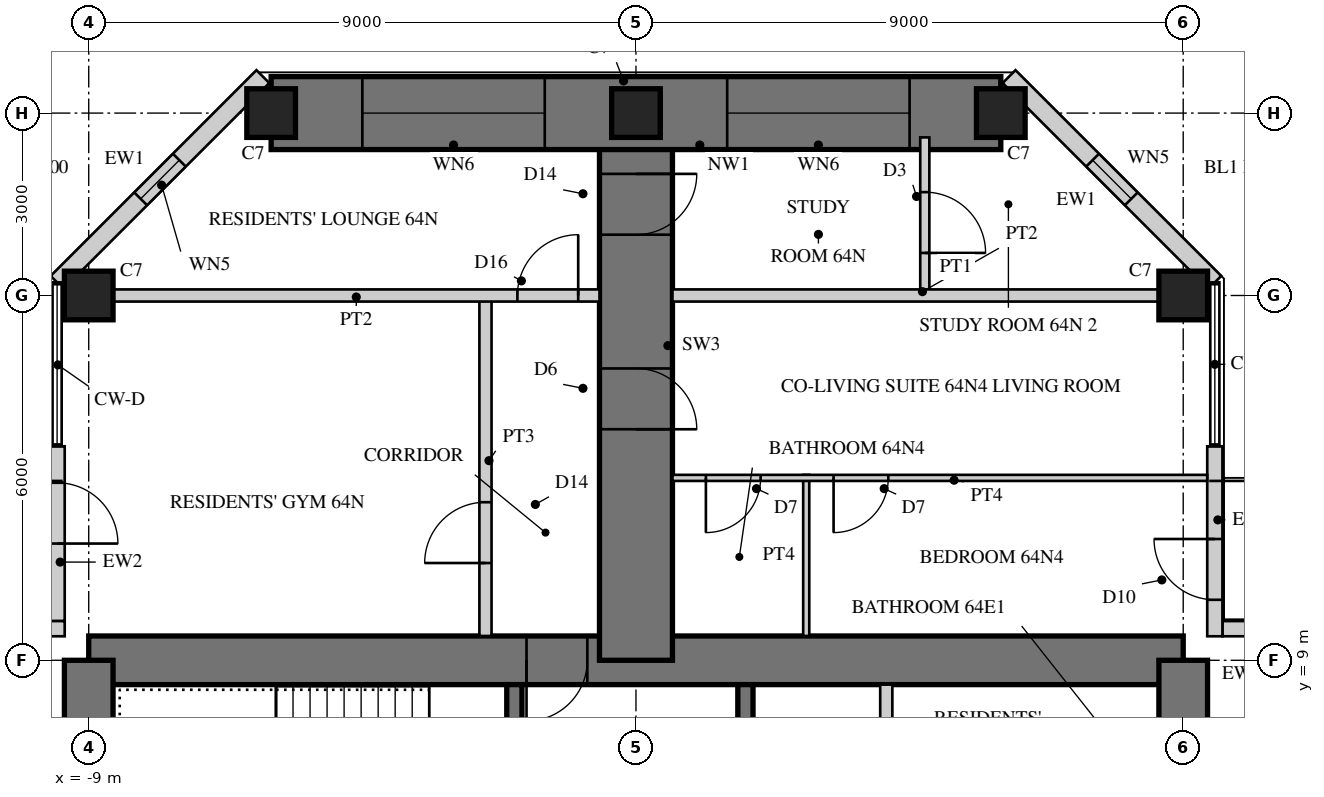
"""IFC4 building model, lengths in metres.
Left out: names, types, materials, properties, quantities, classifications, styles, units other than length and angle.
Written with IfcOpenShell. Run it as: python <this file> out.ifc"""

import sys

from ifc_helpers import new_model, si_unit, direction, frame, frame_2d, origin, origin_2d, place, context, subcontext, project, spatial, rectangle, hollow_rectangle, extrude, element, fill, save


model = new_model("IFC4")
c1 = context("Model", 3, precision=1e-05, world=origin(), true_north=direction((0.0, 1.0)))
c2 = subcontext(c1, "Body", "Model", "MODEL_VIEW")
j1 = project(units=[si_unit("LENGTHUNIT", "METRE"), si_unit("PLANEANGLEUNIT", "RADIAN")], contexts=[c1])
p1 = place(None, origin())
s1 = spatial("IfcSite", under=j1, at=p1, CompositionType="ELEMENT")
p2 = place(p1, origin())
s2 = spatial("IfcBuilding", under=s1, at=p2, CompositionType="ELEMENT")
p3 = place(p2, frame((0.0, 0.0, 249.3)))
s3 = spatial("IfcBuildingStorey", under=s2, at=p3, CompositionType="ELEMENT", Elevation=249.3)
p4 = place(p3, frame((9.0, 9.0, 0.0), z_axis=(0.0, 0.0, 1.0), x_axis=(-1.0, 0.0, 0.0)))
e1 = element("IfcWall", 1, at=p4, inside=s3, PredefinedType="SHEAR", context=c2, shape_type="SweptSolid", body=[
    extrude(rectangle(XDim=18.0, YDim=0.8, at=frame_2d((9.0, 0.0))), origin(), (0.0, 0.0, 1.0), 3.4),
])
p5 = place(p4, frame((9.8, 0.0, 0.0)))
e2 = element("IfcOpeningElement", 2, at=p5, cuts=e1, PredefinedType="OPENING", context=c2, shape_type="SweptSolid", body=[
    extrude(rectangle(XDim=1.0, YDim=2.4, at=frame_2d((0.5, 1.2))), frame((0.0, 0.41, 0.0), z_axis=(0.0, -1.0, 0.0), x_axis=(1.0, 0.0, 0.0)), (0.0, 0.0, 1.0), 0.82),
])
p6 = place(p3, frame((9.0, -9.0, 0.0), z_axis=(0.0, 0.0, 1.0), x_axis=(0.0, 1.0, 0.0)))
e3 = element("IfcWall", 3, at=p6, inside=s3, PredefinedType="SHEAR", context=c2, shape_type="SweptSolid", body=[
    extrude(rectangle(XDim=18.0, YDim=0.8, at=frame_2d((9.0, 0.0))), origin(), (0.0, 0.0, 1.0), 3.4),
])
p7 = place(p6, frame((9.8, 0.0, 0.0)))
e4 = element("IfcOpeningElement", 4, at=p7, cuts=e3, PredefinedType="OPENING", context=c2, shape_type="SweptSolid", body=[
    extrude(rectangle(XDim=1.0, YDim=2.4, at=frame_2d((0.5, 1.2))), frame((0.0, 0.41, 0.0), z_axis=(0.0, -1.0, 0.0), x_axis=(1.0, 0.0, 0.0)), (0.0, 0.0, 1.0), 0.82),
])
p8 = place(p3, frame((-9.0, 9.0, 0.0), z_axis=(0.0, 0.0, 1.0), x_axis=(0.0, -1.0, 0.0)))
e5 = element("IfcWall", 5, at=p8, inside=s3, PredefinedType="SHEAR", context=c2, shape_type="SweptSolid", body=[
    extrude(rectangle(XDim=18.0, YDim=0.8, at=frame_2d((9.0, 0.0))), origin(), (0.0, 0.0, 1.0), 3.4),
])
p9 = place(p8, frame((9.8, 0.0, 0.0)))
e6 = element("IfcOpeningElement", 6, at=p9, cuts=e5, PredefinedType="OPENING", context=c2, shape_type="SweptSolid", body=[
    extrude(rectangle(XDim=1.0, YDim=2.4, at=frame_2d((0.5, 1.2))), frame((0.0, 0.41, 0.0), z_axis=(0.0, -1.0, 0.0), x_axis=(1.0, 0.0, 0.0)), (0.0, 0.0, 1.0), 0.82),
])
p10 = place(p3, frame((1.8, 1.875, 0.0), z_axis=(0.0, 0.0, 1.0), x_axis=(0.0, 1.0, 0.0)))
e7 = element("IfcWall", 7, at=p10, inside=s3, PredefinedType="SHEAR", context=c2, shape_type="SweptSolid", body=[
    extrude(rectangle(XDim=6.725, YDim=0.25, at=frame_2d((3.363, 0.0))), origin(), (0.0, 0.0, 1.0), 3.4),
])
p11 = place(p10, frame((1.875, 0.0, 0.0)))
e8 = element("IfcOpeningElement", 8, at=p11, cuts=e7, PredefinedType="OPENING", context=c2, shape_type="SweptSolid", body=[
    extrude(rectangle(XDim=1.6, YDim=2.4, at=frame_2d((0.8, 1.2))), frame((0.0, 0.135, 0.0), z_axis=(0.0, -1.0, 0.0), x_axis=(1.0, 0.0, 0.0)), (0.0, 0.0, 1.0), 0.27),
])
p12 = place(p3, frame((4.117, 5.975, 0.0), z_axis=(0.0, 0.0, 1.0), x_axis=(0.0, 1.0, 0.0)))
e9 = element("IfcWall", 9, at=p12, inside=s3, PredefinedType="PARTITIONING", context=c2, shape_type="SweptSolid", body=[
    extrude(rectangle(XDim=2.625, YDim=0.2, at=frame_2d((1.312, 0.0))), origin(), (0.0, 0.0, 1.0), 3.4),
])
p13 = place(p3, frame((-2.0, 1.675, 0.0), z_axis=(0.0, 0.0, 1.0), x_axis=(0.0, 1.0, 0.0)))
e10 = element("IfcWall", 10, at=p13, inside=s3, PredefinedType="SHEAR", context=c2, shape_type="SweptSolid", body=[
    extrude(rectangle(XDim=6.925, YDim=0.25, at=frame_2d((3.462, 0.0))), origin(), (0.0, 0.0, 1.0), 3.4),
])
p14 = place(p13, frame((0.725, 0.0, 0.0)))
e11 = element("IfcOpeningElement", 11, at=p14, cuts=e10, PredefinedType="OPENING", context=c2, shape_type="SweptSolid", body=[
    extrude(rectangle(XDim=1.0, YDim=2.1, at=frame_2d((0.5, 1.05))), frame((0.0, 0.135, 0.0), z_axis=(0.0, -1.0, 0.0), x_axis=(1.0, 0.0, 0.0)), (0.0, 0.0, 1.0), 0.27),
])
p15 = place(p3, frame((0.0, 9.0, 0.0), z_axis=(0.0, 0.0, 1.0), x_axis=(0.0, 1.0, 0.0)))
e12 = element("IfcWall", 12, at=p15, inside=s3, PredefinedType="SHEAR", context=c2, shape_type="SweptSolid", body=[
    extrude(rectangle(XDim=9.0, YDim=1.2, at=frame_2d((4.5, 0.0))), origin(), (0.0, 0.0, 1.0), 3.4),
])
p16 = place(p15, frame((3.8, 0.0, 0.0)))
e13 = element("IfcOpeningElement", 13, at=p16, cuts=e12, PredefinedType="OPENING", context=c2, shape_type="SweptSolid", body=[
    extrude(rectangle(XDim=1.0, YDim=2.15, at=frame_2d((0.5, 1.075))), frame((0.0, 0.61, 0.0), z_axis=(0.0, -1.0, 0.0), x_axis=(1.0, 0.0, 0.0)), (0.0, 0.0, 1.0), 1.22),
])
p17 = place(p15, frame((7.0, 0.0, 0.0)))
e14 = element("IfcOpeningElement", 14, at=p17, cuts=e12, PredefinedType="OPENING", context=c2, shape_type="SweptSolid", body=[
    extrude(rectangle(XDim=1.0, YDim=2.2, at=frame_2d((0.5, 1.1))), frame((0.0, 0.61, 0.0), z_axis=(0.0, -1.0, 0.0), x_axis=(1.0, 0.0, 0.0)), (0.0, 0.0, 1.0), 1.22),
])
p18 = place(p3, frame((6.0, 18.0, 0.0), z_axis=(0.0, 0.0, 1.0), x_axis=(-1.0, 0.0, 0.0)))
e15 = element("IfcWall", 15, at=p18, inside=s3, PredefinedType="SHEAR", context=c2, shape_type="SweptSolid", body=[
    extrude(rectangle(XDim=12.0, YDim=1.2, at=frame_2d((6.0, 0.0))), origin(), (0.0, 0.0, 1.0), 3.4),
])
p19 = place(p18, frame((1.5, 0.0, 0.6)))
e16 = element("IfcOpeningElement", 16, at=p19, cuts=e15, PredefinedType="OPENING", context=c2, shape_type="SweptSolid", body=[
    extrude(rectangle(XDim=3.0, YDim=2.4, at=frame_2d((1.5, 1.2))), frame((0.0, 0.61, 0.0), z_axis=(0.0, -1.0, 0.0), x_axis=(1.0, 0.0, 0.0)), (0.0, 0.0, 1.0), 1.22),
])
p20 = place(p18, frame((7.5, 0.0, 0.6)))
e17 = element("IfcOpeningElement", 17, at=p20, cuts=e15, PredefinedType="OPENING", context=c2, shape_type="SweptSolid", body=[
    extrude(rectangle(XDim=3.0, YDim=2.4, at=frame_2d((1.5, 1.2))), frame((0.0, 0.61, 0.0), z_axis=(0.0, -1.0, 0.0), x_axis=(1.0, 0.0, 0.0)), (0.0, 0.0, 1.0), 1.22),
])
for number, where, z_axis, x_axis in (
    (18, (9.0, 15.0, 0.0), (0.0, 0.0, 1.0), (1.0, 0.0, 0.0)),
    (19, (-9.0, 15.0, 0.0), (0.0, 0.0, 1.0), (1.0, 0.0, 0.0)),
    (20, (6.0, 18.0, 0.0), (0.0, 0.0, 1.0), (1.0, 0.0, 0.0)),
    (21, (0.0, 18.0, 0.0), (0.0, 0.0, 1.0), (1.0, 0.0, 0.0)),
    (22, (-6.0, 18.0, 0.0), (0.0, 0.0, 1.0), (1.0, 0.0, 0.0)),
):
    element("IfcColumn", number, at=place(p3, frame(where, z_axis=z_axis, x_axis=x_axis)), inside=s3, PredefinedType="COLUMN", context=c2, shape_type="SweptSolid", body=[
        extrude(rectangle(XDim=0.8, YDim=0.8, at=origin_2d()), origin(), (0.0, 0.0, 1.0), 3.4),
    ])
p21 = place(p3, frame((12.52, 9.52, 0.0), z_axis=(0.0, 0.0, 1.0), x_axis=(-1.0, 0.0, 0.0)))
e23 = element("IfcWall", 23, at=p21, inside=s3, PredefinedType="SOLIDWALL", context=c2, shape_type="SweptSolid", body=[
    extrude(rectangle(XDim=2.875, YDim=0.25, at=frame_2d((1.438, 0.0))), origin(), (0.0, 0.0, 1.0), 3.15),
])
p22 = place(p21, frame((0.6, 0.0, 0.0)))
e24 = element("IfcOpeningElement", 24, at=p22, cuts=e23, PredefinedType="OPENING", context=c2, shape_type="SweptSolid", body=[
    extrude(rectangle(XDim=1.0, YDim=2.2, at=frame_2d((0.5, 1.1))), frame((0.0, 0.135, 0.0), z_axis=(0.0, -1.0, 0.0), x_axis=(1.0, 0.0, 0.0)), (0.0, 0.0, 1.0), 0.27),
])
p23 = place(p3, frame((9.52, 9.395, 0.0), z_axis=(0.0, 0.0, 1.0), x_axis=(0.0, 1.0, 0.0)))
e25 = element("IfcWall", 25, at=p23, inside=s3, PredefinedType="SOLIDWALL", context=c2, shape_type="SweptSolid", body=[
    extrude(rectangle(XDim=3.125, YDim=0.25, at=frame_2d((1.562, 0.0))), origin(), (0.0, 0.0, 1.0), 3.15),
])
p24 = place(p23, frame((0.6, 0.0, 0.0)))
e26 = element("IfcOpeningElement", 26, at=p24, cuts=e25, PredefinedType="OPENING", context=c2, shape_type="SweptSolid", body=[
    extrude(rectangle(XDim=1.0, YDim=2.2, at=frame_2d((0.5, 1.1))), frame((0.0, 0.135, 0.0), z_axis=(0.0, -1.0, 0.0), x_axis=(1.0, 0.0, 0.0)), (0.0, 0.0, 1.0), 0.27),
])
p25 = place(p3, frame((9.52, 15.215, 0.0), z_axis=(0.0, 0.0, 1.0), x_axis=(-0.707081278264, 0.707132283189, 0.0)))
e27 = element("IfcWall", 27, at=p25, inside=s3, PredefinedType="SOLIDWALL", context=c2, shape_type="SweptSolid", body=[
    extrude(rectangle(XDim=4.787, YDim=0.3, at=frame_2d((2.393, 0.0))), origin(), (0.0, 0.0, 1.0), 3.15),
])
p26 = place(p25, frame((1.943, 0.0, 0.3)))
e28 = element("IfcOpeningElement", 28, at=p26, cuts=e27, PredefinedType="OPENING", context=c2, shape_type="SweptSolid", body=[
    extrude(rectangle(XDim=0.9, YDim=2.4, at=frame_2d((0.45, 1.2))), frame((0.0, 0.16, 0.0), z_axis=(0.0, -1.0, 0.0), x_axis=(1.0, 0.0, 0.0)), (0.0, 0.0, 1.0), 0.32),
])
p27 = place(p3, frame((-6.135, 18.6, 0.0), z_axis=(0.0, 0.0, 1.0), x_axis=(-0.707081278264, -0.707132283189, 0.0)))
e29 = element("IfcWall", 29, at=p27, inside=s3, PredefinedType="SOLIDWALL", context=c2, shape_type="SweptSolid", body=[
    extrude(rectangle(XDim=4.787, YDim=0.3, at=frame_2d((2.393, 0.0))), origin(), (0.0, 0.0, 1.0), 3.15),
])
p28 = place(p27, frame((1.943, 0.0, 0.3)))
e30 = element("IfcOpeningElement", 30, at=p28, cuts=e29, PredefinedType="OPENING", context=c2, shape_type="SweptSolid", body=[
    extrude(rectangle(XDim=0.9, YDim=2.4, at=frame_2d((0.45, 1.2))), frame((0.0, 0.16, 0.0), z_axis=(0.0, -1.0, 0.0), x_axis=(1.0, 0.0, 0.0)), (0.0, 0.0, 1.0), 0.32),
])
p29 = place(p3, frame((-9.52, 12.52, 0.0), z_axis=(0.0, 0.0, 1.0), x_axis=(0.0, -1.0, 0.0)))
e31 = element("IfcWall", 31, at=p29, inside=s3, PredefinedType="SOLIDWALL", context=c2, shape_type="SweptSolid", body=[
    extrude(rectangle(XDim=2.875, YDim=0.25, at=frame_2d((1.438, 0.0))), origin(), (0.0, 0.0, 1.0), 3.15),
])
p30 = place(p29, frame((0.6, 0.0, 0.0)))
e32 = element("IfcOpeningElement", 32, at=p30, cuts=e31, PredefinedType="OPENING", context=c2, shape_type="SweptSolid", body=[
    extrude(rectangle(XDim=1.0, YDim=2.2, at=frame_2d((0.5, 1.1))), frame((0.0, 0.135, 0.0), z_axis=(0.0, -1.0, 0.0), x_axis=(1.0, 0.0, 0.0)), (0.0, 0.0, 1.0), 0.27),
])
p31 = place(p3, frame((-9.395, 9.52, 0.0), z_axis=(0.0, 0.0, 1.0), x_axis=(-1.0, 0.0, 0.0)))
e33 = element("IfcWall", 33, at=p31, inside=s3, PredefinedType="SOLIDWALL", context=c2, shape_type="SweptSolid", body=[
    extrude(rectangle(XDim=3.125, YDim=0.25, at=frame_2d((1.562, 0.0))), origin(), (0.0, 0.0, 1.0), 3.15),
])
p32 = place(p31, frame((0.6, 0.0, 0.0)))
e34 = element("IfcOpeningElement", 34, at=p32, cuts=e33, PredefinedType="OPENING", context=c2, shape_type="SweptSolid", body=[
    extrude(rectangle(XDim=1.0, YDim=2.2, at=frame_2d((0.5, 1.1))), frame((0.0, 0.135, 0.0), z_axis=(0.0, -1.0, 0.0), x_axis=(1.0, 0.0, 0.0)), (0.0, 0.0, 1.0), 0.27),
])
p33 = place(p3, frame((2.8, 9.4, 0.0), z_axis=(0.0, 0.0, 1.0), x_axis=(0.0, 1.0, 0.0)))
e35 = element("IfcWall", 35, at=p33, inside=s3, PredefinedType="PARTITIONING", context=c2, shape_type="SweptSolid", body=[
    extrude(rectangle(XDim=2.65, YDim=0.1, at=frame_2d((1.325, 0.0))), origin(), (0.0, 0.0, 1.0), 3.15),
])
p34 = place(p3, frame((9.395, 12.0, 0.0), z_axis=(0.0, 0.0, 1.0), x_axis=(-1.0, 0.0, 0.0)))
e36 = element("IfcWall", 36, at=p34, inside=s3, PredefinedType="PARTITIONING", context=c2, shape_type="SweptSolid", body=[
    extrude(rectangle(XDim=8.795, YDim=0.1, at=frame_2d((4.397, 0.0))), origin(), (0.0, 0.0, 1.0), 3.15),
])
p35 = place(p34, frame((5.245, 0.0, 0.0)))
e37 = element("IfcOpeningElement", 37, at=p35, cuts=e36, PredefinedType="OPENING", context=c2, shape_type="SweptSolid", body=[
    extrude(rectangle(XDim=0.9, YDim=2.1, at=frame_2d((0.45, 1.05))), frame((0.0, 0.06, 0.0), z_axis=(0.0, -1.0, 0.0), x_axis=(1.0, 0.0, 0.0)), (0.0, 0.0, 1.0), 0.12),
])
p36 = place(p34, frame((7.345, 0.0, 0.0)))
e38 = element("IfcOpeningElement", 38, at=p36, cuts=e36, PredefinedType="OPENING", context=c2, shape_type="SweptSolid", body=[
    extrude(rectangle(XDim=0.9, YDim=2.1, at=frame_2d((0.45, 1.05))), frame((0.0, 0.06, 0.0), z_axis=(0.0, -1.0, 0.0), x_axis=(1.0, 0.0, 0.0)), (0.0, 0.0, 1.0), 0.12),
])
p37 = place(p3, frame((-2.475, 9.4, 0.0), z_axis=(0.0, 0.0, 1.0), x_axis=(0.0, 1.0, 0.0)))
e39 = element("IfcWall", 39, at=p37, inside=s3, PredefinedType="SOLIDWALL", context=c2, shape_type="SweptSolid", body=[
    extrude(rectangle(XDim=5.6, YDim=0.2, at=frame_2d((2.8, 0.0))), origin(), (0.0, 0.0, 1.0), 3.15),
])
p38 = place(p37, frame((1.2, 0.0, 0.0)))
e40 = element("IfcOpeningElement", 40, at=p38, cuts=e39, PredefinedType="OPENING", context=c2, shape_type="SweptSolid", body=[
    extrude(rectangle(XDim=1.0, YDim=2.2, at=frame_2d((0.5, 1.1))), frame((0.0, 0.11, 0.0), z_axis=(0.0, -1.0, 0.0), x_axis=(1.0, 0.0, 0.0)), (0.0, 0.0, 1.0), 0.22),
])
p39 = place(p3, frame((4.75, 15.1, 0.0), z_axis=(0.0, 0.0, 1.0), x_axis=(0.0, 1.0, 0.0)))
e41 = element("IfcWall", 41, at=p39, inside=s3, PredefinedType="PARTITIONING", context=c2, shape_type="SweptSolid", body=[
    extrude(rectangle(XDim=2.5, YDim=0.15, at=frame_2d((1.25, 0.0))), origin(), (0.0, 0.0, 1.0), 3.15),
])
p40 = place(p39, frame((0.6, 0.0, 0.0)))
e42 = element("IfcOpeningElement", 42, at=p40, cuts=e41, PredefinedType="OPENING", context=c2, shape_type="SweptSolid", body=[
    extrude(rectangle(XDim=1.0, YDim=2.1, at=frame_2d((0.5, 1.05))), frame((0.0, 0.085, 0.0), z_axis=(0.0, -1.0, 0.0), x_axis=(1.0, 0.0, 0.0)), (0.0, 0.0, 1.0), 0.17),
])
p41 = place(p3, frame((8.6, 15.0, 0.0), z_axis=(0.0, 0.0, 1.0), x_axis=(-1.0, 0.0, 0.0)))
e43 = element("IfcWall", 43, at=p41, inside=s3, PredefinedType="SOLIDWALL", context=c2, shape_type="SweptSolid", body=[
    extrude(rectangle(XDim=8.0, YDim=0.2, at=frame_2d((4.0, 0.0))), origin(), (0.0, 0.0, 1.0), 2.1),
])
p42 = place(p3, frame((-0.6, 15.0, 0.0), z_axis=(0.0, 0.0, 1.0), x_axis=(-1.0, 0.0, 0.0)))
e44 = element("IfcWall", 44, at=p42, inside=s3, PredefinedType="SOLIDWALL", context=c2, shape_type="SweptSolid", body=[
    extrude(rectangle(XDim=8.0, YDim=0.2, at=frame_2d((4.0, 0.0))), origin(), (0.0, 0.0, 1.0), 2.1),
])
p43 = place(p42, frame((0.35, 0.0, 0.0)))
e45 = element("IfcOpeningElement", 45, at=p43, cuts=e44, PredefinedType="OPENING", context=c2, shape_type="SweptSolid", body=[
    extrude(rectangle(XDim=1.0, YDim=2.0, at=frame_2d((0.5, 1.0))), frame((0.0, 0.11, 0.0), z_axis=(0.0, -1.0, 0.0), x_axis=(1.0, 0.0, 0.0)), (0.0, 0.0, 1.0), 0.22),
])
p44 = place(p24, origin())
e46 = element("IfcDoor", 46, at=p44, inside=s3, OperationType="SINGLE_SWING_RIGHT", PredefinedType="DOOR", context=c2, shape_type="SweptSolid", body=[
    extrude(hollow_rectangle(XDim=1.0, YDim=2.2, WallThickness=0.06, at=frame_2d((0.5, 1.1))), frame((0.0, 0.025, 0.0), z_axis=(0.0, -1.0, 0.0), x_axis=(1.0, 0.0, 0.0)), (0.0, 0.0, 1.0), 0.05),
    extrude(rectangle(XDim=0.879, YDim=2.079, at=frame_2d((0.5, 1.1))), frame((0.0, 0.025, 0.0), z_axis=(0.0, -1.0, 0.0), x_axis=(1.0, 0.0, 0.0)), (0.0, 0.0, 1.0), 0.05),
])
fill(e26, e46)
p45 = place(p26, origin())
e47 = element("IfcWindow", 47, at=p45, inside=s3, PartitioningType="SINGLE_PANEL", PredefinedType="WINDOW", context=c2, shape_type="SweptSolid", body=[
    extrude(hollow_rectangle(XDim=0.9, YDim=2.4, WallThickness=0.06, at=frame_2d((0.45, 1.2))), frame((0.0, 0.03, 0.0), z_axis=(0.0, -1.0, 0.0), x_axis=(1.0, 0.0, 0.0)), (0.0, 0.0, 1.0), 0.06),
    extrude(rectangle(XDim=0.779, YDim=2.279, at=frame_2d((0.45, 1.2))), frame((0.0, 0.03, 0.0), z_axis=(0.0, -1.0, 0.0), x_axis=(1.0, 0.0, 0.0)), (0.0, 0.0, 1.0), 0.06),
])
fill(e28, e47)
p46 = place(p19, origin())
e48 = element("IfcWindow", 48, at=p46, inside=s3, PartitioningType="SINGLE_PANEL", PredefinedType="WINDOW", context=c2, shape_type="SweptSolid", body=[
    extrude(hollow_rectangle(XDim=3.0, YDim=2.4, WallThickness=0.06, at=frame_2d((1.5, 1.2))), frame((0.0, 0.03, 0.0), z_axis=(0.0, -1.0, 0.0), x_axis=(1.0, 0.0, 0.0)), (0.0, 0.0, 1.0), 0.06),
    extrude(rectangle(XDim=2.879, YDim=2.279, at=frame_2d((1.5, 1.2))), frame((0.0, 0.03, 0.0), z_axis=(0.0, -1.0, 0.0), x_axis=(1.0, 0.0, 0.0)), (0.0, 0.0, 1.0), 0.06),
])
fill(e16, e48)
p47 = place(p20, origin())
e49 = element("IfcWindow", 49, at=p47, inside=s3, PartitioningType="SINGLE_PANEL", PredefinedType="WINDOW", context=c2, shape_type="SweptSolid", body=[
    extrude(hollow_rectangle(XDim=3.0, YDim=2.4, WallThickness=0.06, at=frame_2d((1.5, 1.2))), frame((0.0, 0.03, 0.0), z_axis=(0.0, -1.0, 0.0), x_axis=(1.0, 0.0, 0.0)), (0.0, 0.0, 1.0), 0.06),
    extrude(rectangle(XDim=2.879, YDim=2.279, at=frame_2d((1.5, 1.2))), frame((0.0, 0.03, 0.0), z_axis=(0.0, -1.0, 0.0), x_axis=(1.0, 0.0, 0.0)), (0.0, 0.0, 1.0), 0.06),
])
fill(e17, e49)
p48 = place(p28, origin())
e50 = element("IfcWindow", 50, at=p48, inside=s3, PartitioningType="SINGLE_PANEL", PredefinedType="WINDOW", context=c2, shape_type="SweptSolid", body=[
    extrude(hollow_rectangle(XDim=0.9, YDim=2.4, WallThickness=0.06, at=frame_2d((0.45, 1.2))), frame((0.0, 0.03, 0.0), z_axis=(0.0, -1.0, 0.0), x_axis=(1.0, 0.0, 0.0)), (0.0, 0.0, 1.0), 0.06),
    extrude(rectangle(XDim=0.779, YDim=2.279, at=frame_2d((0.45, 1.2))), frame((0.0, 0.03, 0.0), z_axis=(0.0, -1.0, 0.0), x_axis=(1.0, 0.0, 0.0)), (0.0, 0.0, 1.0), 0.06),
])
fill(e30, e50)
p49 = place(p30, origin())
e51 = element("IfcDoor", 51, at=p49, inside=s3, OperationType="SINGLE_SWING_RIGHT", PredefinedType="DOOR", context=c2, shape_type="SweptSolid", body=[
    extrude(hollow_rectangle(XDim=1.0, YDim=2.2, WallThickness=0.06, at=frame_2d((0.5, 1.1))), frame((0.0, 0.025, 0.0), z_axis=(0.0, -1.0, 0.0), x_axis=(1.0, 0.0, 0.0)), (0.0, 0.0, 1.0), 0.05),
    extrude(rectangle(XDim=0.879, YDim=2.079, at=frame_2d((0.5, 1.1))), frame((0.0, 0.025, 0.0), z_axis=(0.0, -1.0, 0.0), x_axis=(1.0, 0.0, 0.0)), (0.0, 0.0, 1.0), 0.05),
])
fill(e32, e51)
p50 = place(p35, origin())
e52 = element("IfcDoor", 52, at=p50, inside=s3, OperationType="SINGLE_SWING_RIGHT", PredefinedType="DOOR", context=c2, shape_type="SweptSolid", body=[
    extrude(rectangle(XDim=0.9, YDim=2.1, at=frame_2d((0.45, 1.05))), frame((0.0, 0.025, 0.0), z_axis=(0.0, -1.0, 0.0), x_axis=(1.0, 0.0, 0.0)), (0.0, 0.0, 1.0), 0.05),
])
fill(e37, e52)
p51 = place(p36, origin())
e53 = element("IfcDoor", 53, at=p51, inside=s3, OperationType="SINGLE_SWING_RIGHT", PredefinedType="DOOR", context=c2, shape_type="SweptSolid", body=[
    extrude(rectangle(XDim=0.9, YDim=2.1, at=frame_2d((0.45, 1.05))), frame((0.0, 0.025, 0.0), z_axis=(0.0, -1.0, 0.0), x_axis=(1.0, 0.0, 0.0)), (0.0, 0.0, 1.0), 0.05),
])
fill(e38, e53)
p52 = place(p38, origin())
e54 = element("IfcDoor", 54, at=p52, inside=s3, OperationType="SINGLE_SWING_LEFT", PredefinedType="DOOR", context=c2, shape_type="SweptSolid", body=[
    extrude(rectangle(XDim=1.0, YDim=2.2, at=frame_2d((0.5, 1.1))), frame((0.0, 0.025, 0.0), z_axis=(0.0, -1.0, 0.0), x_axis=(1.0, 0.0, 0.0)), (0.0, 0.0, 1.0), 0.05),
])
fill(e40, e54)
p53 = place(p40, frame((1.0, 0.0, 0.0), z_axis=(0.0, 0.0, 1.0), x_axis=(-1.0, 0.0, 0.0)))
e55 = element("IfcDoor", 55, at=p53, inside=s3, OperationType="SINGLE_SWING_RIGHT", PredefinedType="DOOR", context=c2, shape_type="SweptSolid", body=[
    extrude(rectangle(XDim=1.0, YDim=2.1, at=frame_2d((0.5, 1.05))), frame((0.0, 0.025, 0.0), z_axis=(0.0, -1.0, 0.0), x_axis=(1.0, 0.0, 0.0)), (0.0, 0.0, 1.0), 0.05),
])
fill(e42, e55)
p54 = place(p43, frame((1.0, 0.0, 0.0), z_axis=(0.0, 0.0, 1.0), x_axis=(-1.0, 0.0, 0.0)))
e56 = element("IfcDoor", 56, at=p54, inside=s3, OperationType="SINGLE_SWING_RIGHT", PredefinedType="DOOR", context=c2, shape_type="SweptSolid", body=[
    extrude(rectangle(XDim=1.0, YDim=2.0, at=frame_2d((0.5, 1.0))), frame((0.0, 0.025, 0.0), z_axis=(0.0, -1.0, 0.0), x_axis=(1.0, 0.0, 0.0)), (0.0, 0.0, 1.0), 0.05),
])
fill(e45, e56)
p55 = place(p16, frame((1.0, 0.0, 0.0), z_axis=(0.0, 0.0, 1.0), x_axis=(-1.0, 0.0, 0.0)))
e57 = element("IfcDoor", 57, at=p55, inside=s3, OperationType="SINGLE_SWING_RIGHT", PredefinedType="DOOR", context=c2, shape_type="SweptSolid", body=[
    extrude(rectangle(XDim=1.0, YDim=2.15, at=frame_2d((0.5, 1.075))), frame((0.0, 0.025, 0.0), z_axis=(0.0, -1.0, 0.0), x_axis=(1.0, 0.0, 0.0)), (0.0, 0.0, 1.0), 0.05),
])
fill(e13, e57)
p56 = place(p17, frame((1.0, 0.0, 0.0), z_axis=(0.0, 0.0, 1.0), x_axis=(-1.0, 0.0, 0.0)))
e58 = element("IfcDoor", 58, at=p56, inside=s3, OperationType="SINGLE_SWING_LEFT", PredefinedType="DOOR", context=c2, shape_type="SweptSolid", body=[
    extrude(rectangle(XDim=1.0, YDim=2.2, at=frame_2d((0.5, 1.1))), frame((0.0, 0.025, 0.0), z_axis=(0.0, -1.0, 0.0), x_axis=(1.0, 0.0, 0.0)), (0.0, 0.0, 1.0), 0.05),
])
fill(e14, e58)
p57 = place(p5, origin())
e59 = element("IfcDoor", 59, at=p57, inside=s3, OperationType="SINGLE_SWING_RIGHT", PredefinedType="DOOR", context=c2, shape_type="SweptSolid", body=[
    extrude(rectangle(XDim=1.0, YDim=2.4, at=frame_2d((0.5, 1.2))), frame((0.0, 0.055, 0.0), z_axis=(0.0, -1.0, 0.0), x_axis=(1.0, 0.0, 0.0)), (0.0, 0.0, 1.0), 0.05),
])
fill(e2, e59)
save(model, sys.argv[1])
